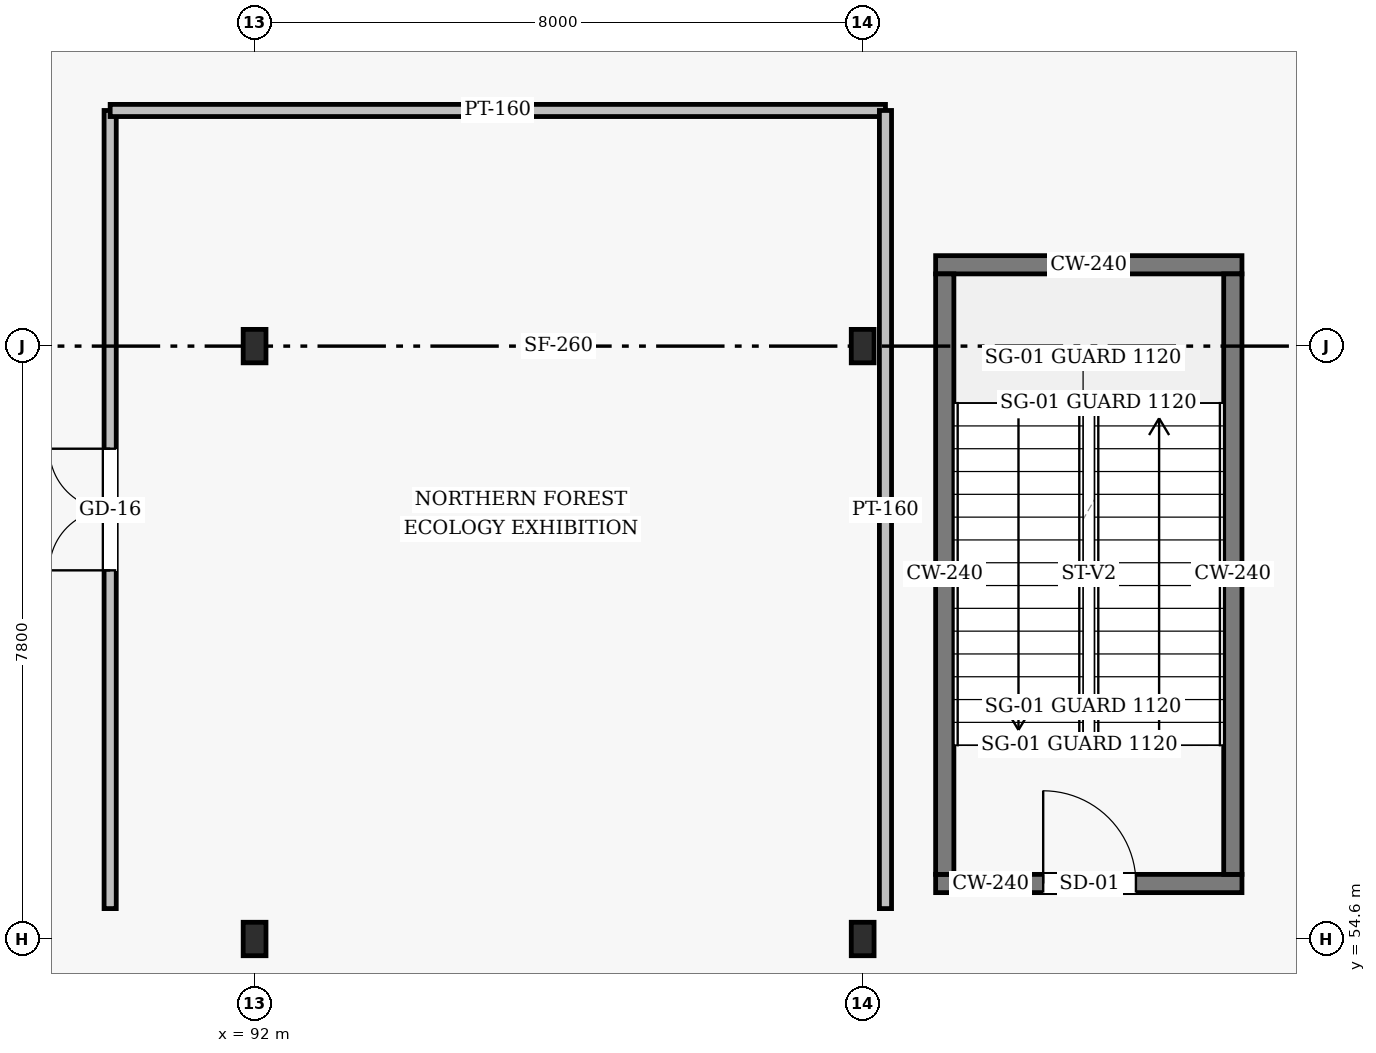
"""IFC4 building model, lengths in metres.
Left out: names, types, materials, properties, quantities, classifications, styles, units other than length and angle.
Written with IfcOpenShell. Run it as: python <this file> out.ifc"""

import sys

from ifc_helpers import new_model, si_unit, direction, frame, frame_2d, origin, origin_2d, place, context, subcontext, project, spatial, rectangle, i_section, extrude, element, fill, save


model = new_model("IFC4")
c1 = context("Model", 3, precision=1e-05, world=origin(), true_north=direction((0.0, 1.0)))
c2 = subcontext(c1, "Body", "Model", "MODEL_VIEW")
j1 = project(units=[si_unit("LENGTHUNIT", "METRE"), si_unit("PLANEANGLEUNIT", "RADIAN")], contexts=[c1])
p1 = place(None, origin())
s1 = spatial("IfcSite", under=j1, at=p1, CompositionType="ELEMENT")
p2 = place(p1, origin())
s2 = spatial("IfcBuilding", under=s1, at=p2, CompositionType="ELEMENT")
p3 = place(p2, origin())
s3 = spatial("IfcBuildingStorey", under=s2, at=p3, CompositionType="ELEMENT", Elevation=0.0)
for number, where, z_axis, x_axis in (
    (1, (92.0, 54.6, 0.0), (0.0, 0.0, 1.0), (1.0, 0.0, 0.0)),
    (2, (92.0, 62.4, 0.0), (0.0, 0.0, 1.0), (1.0, 0.0, 0.0)),
    (3, (100.0, 54.6, 0.0), (0.0, 0.0, 1.0), (1.0, 0.0, 0.0)),
    (4, (100.0, 62.4, 0.0), (0.0, 0.0, 1.0), (1.0, 0.0, 0.0)),
):
    element("IfcColumn", number, at=place(p3, frame(where, z_axis=z_axis, x_axis=x_axis)), inside=s3, PredefinedType="COLUMN", context=c2, shape_type="SweptSolid", body=[
        extrude(i_section(OverallWidth=0.3, OverallDepth=0.44, WebThickness=0.011, FlangeThickness=0.018, FilletRadius=0.024, at=origin_2d()), origin(), (0.0, 0.0, 1.0), 4.8),
    ])
p4 = place(p3, frame((100.96, 55.33, 0.0), z_axis=(0.0, 0.0, 1.0), x_axis=(1.0, 0.0, 0.0)))
e5 = element("IfcWall", 5, at=p4, inside=s3, PredefinedType="SHEAR", context=c2, shape_type="SweptSolid", body=[
    extrude(rectangle(XDim=4.03, YDim=0.24, at=frame_2d((2.015, 0.0))), origin(), (0.0, 0.0, 1.0), 4.56),
])
p5 = place(p4, frame((1.415, 0.0, 0.0)))
e6 = element("IfcOpeningElement", 6, at=p5, cuts=e5, PredefinedType="OPENING", context=c2, shape_type="SweptSolid", body=[
    extrude(rectangle(XDim=1.22, YDim=2.18, at=frame_2d((0.61, 1.09))), frame((0.0, 0.13, 0.0), z_axis=(0.0, -1.0, 0.0), x_axis=(1.0, 0.0, 0.0)), (0.0, 0.0, 1.0), 0.26),
])
p6 = place(p3, frame((100.96, 63.47, 0.0), z_axis=(0.0, 0.0, 1.0), x_axis=(1.0, 0.0, 0.0)))
e7 = element("IfcWall", 7, at=p6, inside=s3, PredefinedType="SHEAR", context=c2, shape_type="SweptSolid", body=[
    extrude(rectangle(XDim=4.03, YDim=0.24, at=frame_2d((2.015, 0.0))), origin(), (0.0, 0.0, 1.0), 4.56),
])
for number, where, z_axis, x_axis in (
    (8, (101.08, 55.45, 0.0), (0.0, 0.0, 1.0), (0.0, 1.0, 0.0)),
    (9, (104.87, 55.45, 0.0), (0.0, 0.0, 1.0), (0.0, 1.0, 0.0)),
):
    element("IfcWall", number, at=place(p3, frame(where, z_axis=z_axis, x_axis=x_axis)), inside=s3, PredefinedType="SHEAR", context=c2, shape_type="SweptSolid", body=[
        extrude(rectangle(XDim=7.9, YDim=0.24, at=frame_2d((3.95, 0.0))), origin(), (0.0, 0.0, 1.0), 4.56),
    ])
p7 = place(p3, frame((90.1, 55.0, 0.0), z_axis=(0.0, 0.0, 1.0), x_axis=(0.0, 1.0, 0.0)))
e10 = element("IfcWall", 10, at=p7, inside=s3, PredefinedType="PARTITIONING", context=c2, shape_type="SweptSolid", body=[
    extrude(rectangle(XDim=10.5, YDim=0.16, at=frame_2d((5.25, 0.0))), origin(), (0.0, 0.0, 1.0), 4.56),
])
p8 = place(p7, frame((4.45, 0.0, 0.0)))
e11 = element("IfcOpeningElement", 11, at=p8, cuts=e10, PredefinedType="OPENING", context=c2, shape_type="SweptSolid", body=[
    extrude(rectangle(XDim=1.6, YDim=2.1, at=frame_2d((0.8, 1.05))), frame((0.0, 0.09, 0.0), z_axis=(0.0, -1.0, 0.0), x_axis=(1.0, 0.0, 0.0)), (0.0, 0.0, 1.0), 0.18),
])
p9 = place(p3, frame((90.1, 65.5, 0.0), z_axis=(0.0, 0.0, 1.0), x_axis=(1.0, 0.0, 0.0)))
e12 = element("IfcWall", 12, at=p9, inside=s3, PredefinedType="PARTITIONING", context=c2, shape_type="SweptSolid", body=[
    extrude(rectangle(XDim=10.2, YDim=0.16, at=frame_2d((5.1, 0.0))), origin(), (0.0, 0.0, 1.0), 4.22),
])
p10 = place(p3, frame((100.3, 55.0, 0.0), z_axis=(0.0, 0.0, 1.0), x_axis=(0.0, 1.0, 0.0)))
e13 = element("IfcWall", 13, at=p10, inside=s3, PredefinedType="PARTITIONING", context=c2, shape_type="SweptSolid", body=[
    extrude(rectangle(XDim=10.5, YDim=0.16, at=frame_2d((5.25, 0.0))), origin(), (0.0, 0.0, 1.0), 4.21),
])
p11 = place(p5, origin())
e14 = element("IfcDoor", 14, at=p11, inside=s3, OperationType="SINGLE_SWING_LEFT", PredefinedType="DOOR", context=c2, shape_type="SweptSolid", body=[
    extrude(rectangle(XDim=1.22, YDim=2.18, at=frame_2d((0.61, 1.09))), frame((0.0, 0.025, 0.0), z_axis=(0.0, -1.0, 0.0), x_axis=(1.0, 0.0, 0.0)), (0.0, 0.0, 1.0), 0.05),
])
fill(e6, e14)
p12 = place(p8, origin())
e15 = element("IfcDoor", 15, at=p12, inside=s3, OperationType="DOUBLE_DOOR_SINGLE_SWING", PredefinedType="DOOR", context=c2, shape_type="SweptSolid", body=[
    extrude(rectangle(XDim=1.6, YDim=2.1, at=frame_2d((0.8, 1.05))), frame((0.0, 0.025, 0.0), z_axis=(0.0, -1.0, 0.0), x_axis=(1.0, 0.0, 0.0)), (0.0, 0.0, 1.0), 0.05),
])
fill(e11, e15)
save(model, sys.argv[1])
